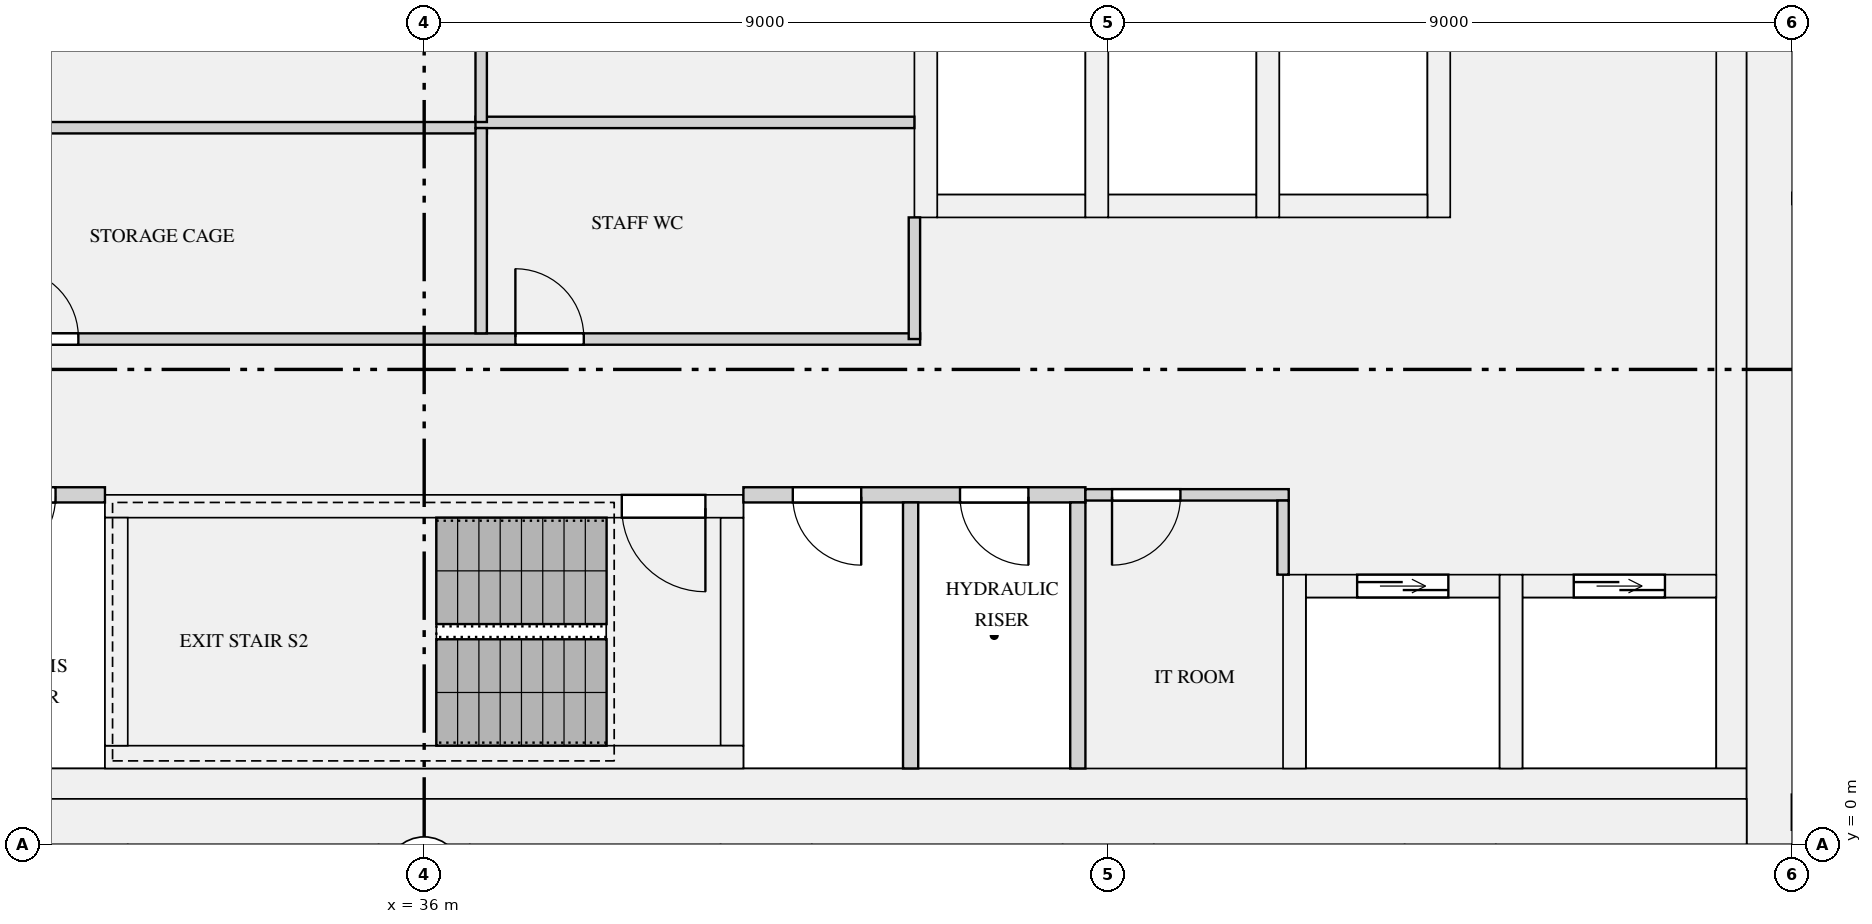
"""IFC4 building model, lengths in metres.
Left out: names, types, materials, properties, quantities, classifications, styles, units other than length and angle.
Written with IfcOpenShell. Run it as: python <this file> out.ifc"""

import sys

from ifc_helpers import new_model, si_unit, direction, frame, frame_2d, origin, place, context, subcontext, project, spatial, rectangle, extrude, element, fill, save


model = new_model("IFC4")
c1 = context("Model", 3, precision=1e-05, world=origin(), true_north=direction((0.0, 1.0)))
c2 = subcontext(c1, "Body", "Model", "MODEL_VIEW")
j1 = project(units=[si_unit("LENGTHUNIT", "METRE"), si_unit("PLANEANGLEUNIT", "RADIAN")], contexts=[c1])
p1 = place(None, origin())
s1 = spatial("IfcSite", under=j1, at=p1, CompositionType="ELEMENT")
p2 = place(p1, origin())
s2 = spatial("IfcBuilding", under=s1, at=p2, CompositionType="ELEMENT")
p3 = place(p2, frame((0.0, 0.0, 229.5)))
s3 = spatial("IfcBuildingStorey", under=s2, at=p3, CompositionType="ELEMENT", Elevation=229.5)
p4 = place(p3, frame((53.7, 0.0, 0.0), z_axis=(0.0, 0.0, 1.0), x_axis=(0.0, 1.0, 0.0)))
e1 = element("IfcWall", 1, at=p4, inside=s3, PredefinedType="SHEAR", context=c2, shape_type="SweptSolid", body=[
    extrude(rectangle(XDim=12.5, YDim=0.6, at=frame_2d((6.25, 0.0))), origin(), (0.0, 0.0, 1.0), 3.15),
])
p5 = place(p3, frame((18.6, 0.3, 0.0), z_axis=(0.0, 0.0, 1.0), x_axis=(1.0, 0.0, 0.0)))
e2 = element("IfcWall", 2, at=p5, inside=s3, PredefinedType="SHEAR", context=c2, shape_type="SweptSolid", body=[
    extrude(rectangle(XDim=34.8, YDim=0.6, at=frame_2d((17.4, 0.0))), origin(), (0.0, 0.0, 1.0), 3.15),
])
p6 = place(p3, frame((53.2, 1.0, 0.0), z_axis=(0.0, 0.0, 1.0), x_axis=(0.0, 1.0, 0.0)))
e3 = element("IfcWall", 3, at=p6, inside=s3, PredefinedType="SHEAR", context=c2, shape_type="SweptSolid", body=[
    extrude(rectangle(XDim=10.9, YDim=0.4, at=frame_2d((5.45, 0.0))), origin(), (0.0, 0.0, 1.0), 3.15),
])
p7 = place(p3, frame((18.6, 0.8, 0.0), z_axis=(0.0, 0.0, 1.0), x_axis=(1.0, 0.0, 0.0)))
e4 = element("IfcWall", 4, at=p7, inside=s3, PredefinedType="SHEAR", context=c2, shape_type="SweptSolid", body=[
    extrude(rectangle(XDim=34.8, YDim=0.4, at=frame_2d((17.4, 0.0))), origin(), (0.0, 0.0, 1.0), 3.15),
])
p8 = place(p3, frame((42.75, 8.4, 0.0), z_axis=(0.0, 0.0, 1.0), x_axis=(1.0, 0.0, 0.0)))
e5 = element("IfcWall", 5, at=p8, inside=s3, PredefinedType="SHEAR", context=c2, shape_type="SweptSolid", body=[
    extrude(rectangle(XDim=1.95, YDim=0.3, at=frame_2d((0.975, 0.0))), origin(), (0.0, 0.0, 1.0), 3.15),
])
p9 = place(p3, frame((42.6, 8.25, 0.0), z_axis=(0.0, 0.0, 1.0), x_axis=(0.0, 1.0, 0.0)))
e6 = element("IfcWall", 6, at=p9, inside=s3, PredefinedType="SHEAR", context=c2, shape_type="SweptSolid", body=[
    extrude(rectangle(XDim=3.65, YDim=0.3, at=frame_2d((1.825, 0.0))), origin(), (0.0, 0.0, 1.0), 3.15),
])
p10 = place(p3, frame((45.0, 8.4, 0.0), z_axis=(0.0, 0.0, 1.0), x_axis=(1.0, 0.0, 0.0)))
e7 = element("IfcWall", 7, at=p10, inside=s3, PredefinedType="SHEAR", context=c2, shape_type="SweptSolid", body=[
    extrude(rectangle(XDim=1.95, YDim=0.3, at=frame_2d((0.975, 0.0))), origin(), (0.0, 0.0, 1.0), 3.15),
])
p11 = place(p3, frame((44.85, 8.25, 0.0), z_axis=(0.0, 0.0, 1.0), x_axis=(0.0, 1.0, 0.0)))
e8 = element("IfcWall", 8, at=p11, inside=s3, PredefinedType="SHEAR", context=c2, shape_type="SweptSolid", body=[
    extrude(rectangle(XDim=3.65, YDim=0.3, at=frame_2d((1.825, 0.0))), origin(), (0.0, 0.0, 1.0), 3.15),
])
p12 = place(p3, frame((47.25, 8.4, 0.0), z_axis=(0.0, 0.0, 1.0), x_axis=(1.0, 0.0, 0.0)))
e9 = element("IfcWall", 9, at=p12, inside=s3, PredefinedType="SHEAR", context=c2, shape_type="SweptSolid", body=[
    extrude(rectangle(XDim=1.95, YDim=0.3, at=frame_2d((0.975, 0.0))), origin(), (0.0, 0.0, 1.0), 3.15),
])
for number, where, z_axis, x_axis in (
    (10, (47.1, 8.25, 0.0), (0.0, 0.0, 1.0), (0.0, 1.0, 0.0)),
    (11, (49.35, 8.25, 0.0), (0.0, 0.0, 1.0), (0.0, 1.0, 0.0)),
):
    element("IfcWall", number, at=place(p3, frame(where, z_axis=z_axis, x_axis=x_axis)), inside=s3, PredefinedType="SHEAR", context=c2, shape_type="SweptSolid", body=[
        extrude(rectangle(XDim=3.65, YDim=0.3, at=frame_2d((1.825, 0.0))), origin(), (0.0, 0.0, 1.0), 3.15),
    ])
p13 = place(p3, frame((47.6, 3.4, 0.0), z_axis=(0.0, 0.0, 1.0), x_axis=(1.0, 0.0, 0.0)))
e12 = element("IfcWall", 12, at=p13, inside=s3, PredefinedType="SHEAR", context=c2, shape_type="SweptSolid", body=[
    extrude(rectangle(XDim=2.55, YDim=0.3, at=frame_2d((1.275, 0.0))), origin(), (0.0, 0.0, 1.0), 3.15),
])
p14 = place(p13, frame((0.675, 0.0, 0.0)))
e13 = element("IfcOpeningElement", 13, at=p14, cuts=e12, PredefinedType="OPENING", context=c2, shape_type="SweptSolid", body=[
    extrude(rectangle(XDim=1.2, YDim=2.1, at=frame_2d((0.6, 1.05))), frame((0.0, 0.16, 0.0), z_axis=(0.0, -1.0, 0.0), x_axis=(1.0, 0.0, 0.0)), (0.0, 0.0, 1.0), 0.32),
])
p15 = place(p3, frame((47.45, 1.0, 0.0), z_axis=(0.0, 0.0, 1.0), x_axis=(0.0, 1.0, 0.0)))
e14 = element("IfcWall", 14, at=p15, inside=s3, PredefinedType="SHEAR", context=c2, shape_type="SweptSolid", body=[
    extrude(rectangle(XDim=2.55, YDim=0.3, at=frame_2d((1.275, 0.0))), origin(), (0.0, 0.0, 1.0), 3.15),
])
p16 = place(p3, frame((50.45, 3.4, 0.0), z_axis=(0.0, 0.0, 1.0), x_axis=(1.0, 0.0, 0.0)))
e15 = element("IfcWall", 15, at=p16, inside=s3, PredefinedType="SHEAR", context=c2, shape_type="SweptSolid", body=[
    extrude(rectangle(XDim=2.55, YDim=0.3, at=frame_2d((1.275, 0.0))), origin(), (0.0, 0.0, 1.0), 3.15),
])
p17 = place(p16, frame((0.675, 0.0, 0.0)))
e16 = element("IfcOpeningElement", 16, at=p17, cuts=e15, PredefinedType="OPENING", context=c2, shape_type="SweptSolid", body=[
    extrude(rectangle(XDim=1.2, YDim=2.1, at=frame_2d((0.6, 1.05))), frame((0.0, 0.16, 0.0), z_axis=(0.0, -1.0, 0.0), x_axis=(1.0, 0.0, 0.0)), (0.0, 0.0, 1.0), 0.32),
])
p18 = place(p3, frame((50.3, 1.0, 0.0), z_axis=(0.0, 0.0, 1.0), x_axis=(0.0, 1.0, 0.0)))
e17 = element("IfcWall", 17, at=p18, inside=s3, PredefinedType="SHEAR", context=c2, shape_type="SweptSolid", body=[
    extrude(rectangle(XDim=2.55, YDim=0.3, at=frame_2d((1.275, 0.0))), origin(), (0.0, 0.0, 1.0), 3.15),
])
p19 = place(p3, frame((31.8, 1.15, 0.0), z_axis=(0.0, 0.0, 1.0), x_axis=(1.0, 0.0, 0.0)))
e18 = element("IfcWall", 18, at=p19, inside=s3, PredefinedType="SHEAR", context=c2, shape_type="SweptSolid", body=[
    extrude(rectangle(XDim=8.4, YDim=0.3, at=frame_2d((4.2, 0.0))), origin(), (0.0, 0.0, 1.0), 3.15),
])
p20 = place(p3, frame((31.8, 4.45, 0.0), z_axis=(0.0, 0.0, 1.0), x_axis=(1.0, 0.0, 0.0)))
e19 = element("IfcWall", 19, at=p20, inside=s3, PredefinedType="SHEAR", context=c2, shape_type="SweptSolid", body=[
    extrude(rectangle(XDim=8.4, YDim=0.3, at=frame_2d((4.2, 0.0))), origin(), (0.0, 0.0, 1.0), 3.15),
])
p21 = place(p20, frame((6.8, 0.0, 0.0)))
e20 = element("IfcOpeningElement", 20, at=p21, cuts=e19, PredefinedType="OPENING", context=c2, shape_type="SweptSolid", body=[
    extrude(rectangle(XDim=1.1, YDim=2.1, at=frame_2d((0.55, 1.05))), frame((0.0, 0.16, 0.0), z_axis=(0.0, -1.0, 0.0), x_axis=(1.0, 0.0, 0.0)), (0.0, 0.0, 1.0), 0.32),
])
for number, where, z_axis, x_axis in (
    (21, (31.95, 1.3, 0.0), (0.0, 0.0, 1.0), (0.0, 1.0, 0.0)),
    (22, (40.05, 1.3, 0.0), (0.0, 0.0, 1.0), (0.0, 1.0, 0.0)),
):
    element("IfcWall", number, at=place(p3, frame(where, z_axis=z_axis, x_axis=x_axis)), inside=s3, PredefinedType="SHEAR", context=c2, shape_type="SweptSolid", body=[
        extrude(rectangle(XDim=3.0, YDim=0.3, at=frame_2d((1.5, 0.0))), origin(), (0.0, 0.0, 1.0), 3.15),
    ])
p22 = place(p3, frame((54.0, 0.425, 0.9), z_axis=(0.0, 0.0, 1.0), x_axis=(1.0, 0.0, 0.0)))
e23 = element("IfcWall", 23, at=p22, inside=s3, PredefinedType="SOLIDWALL", context=c2, shape_type="SweptSolid", body=[
    extrude(rectangle(XDim=4.05, YDim=0.45, at=frame_2d((2.025, 0.0))), origin(), (0.0, 0.0, 1.0), 1.93),
])
p23 = place(p22, frame((1.275, 0.0, 0.15)))
e24 = element("IfcOpeningElement", 24, at=p23, cuts=e23, PredefinedType="OPENING", context=c2, shape_type="SweptSolid", body=[
    extrude(rectangle(XDim=1.5, YDim=1.5, at=frame_2d((0.75, 0.75))), frame((0.0, 0.235, 0.0), z_axis=(0.0, -1.0, 0.0), x_axis=(1.0, 0.0, 0.0)), (0.0, 0.0, 1.0), 0.47),
])
p24 = place(p3, frame((27.3, 4.6, 0.0), z_axis=(0.0, 0.0, 1.0), x_axis=(1.0, 0.0, 0.0)))
e25 = element("IfcWall", 25, at=p24, inside=s3, PredefinedType="PARTITIONING", context=c2, shape_type="SweptSolid", body=[
    extrude(rectangle(XDim=4.5, YDim=0.2, at=frame_2d((2.25, 0.0))), origin(), (0.0, 0.0, 1.0), 2.83),
])
p25 = place(p24, frame((0.75, 0.0, 0.0)))
e26 = element("IfcOpeningElement", 26, at=p25, cuts=e25, PredefinedType="OPENING", context=c2, shape_type="SweptSolid", body=[
    extrude(rectangle(XDim=0.9, YDim=2.1, at=frame_2d((0.45, 1.05))), frame((0.0, 0.11, 0.0), z_axis=(0.0, -1.0, 0.0), x_axis=(1.0, 0.0, 0.0)), (0.0, 0.0, 1.0), 0.22),
])
p26 = place(p24, frame((2.95, 0.0, 0.0)))
e27 = element("IfcOpeningElement", 27, at=p26, cuts=e25, PredefinedType="OPENING", context=c2, shape_type="SweptSolid", body=[
    extrude(rectangle(XDim=0.9, YDim=2.1, at=frame_2d((0.45, 1.05))), frame((0.0, 0.11, 0.0), z_axis=(0.0, -1.0, 0.0), x_axis=(1.0, 0.0, 0.0)), (0.0, 0.0, 1.0), 0.22),
])
p27 = place(p3, frame((40.2, 4.6, 0.0), z_axis=(0.0, 0.0, 1.0), x_axis=(1.0, 0.0, 0.0)))
e28 = element("IfcWall", 28, at=p27, inside=s3, PredefinedType="PARTITIONING", context=c2, shape_type="SweptSolid", body=[
    extrude(rectangle(XDim=4.5, YDim=0.2, at=frame_2d((2.25, 0.0))), origin(), (0.0, 0.0, 1.0), 2.83),
])
p28 = place(p27, frame((0.65, 0.0, 0.0)))
e29 = element("IfcOpeningElement", 29, at=p28, cuts=e28, PredefinedType="OPENING", context=c2, shape_type="SweptSolid", body=[
    extrude(rectangle(XDim=0.9, YDim=2.1, at=frame_2d((0.45, 1.05))), frame((0.0, 0.11, 0.0), z_axis=(0.0, -1.0, 0.0), x_axis=(1.0, 0.0, 0.0)), (0.0, 0.0, 1.0), 0.22),
])
p29 = place(p27, frame((2.85, 0.0, 0.0)))
e30 = element("IfcOpeningElement", 30, at=p29, cuts=e28, PredefinedType="OPENING", context=c2, shape_type="SweptSolid", body=[
    extrude(rectangle(XDim=0.9, YDim=2.1, at=frame_2d((0.45, 1.05))), frame((0.0, 0.11, 0.0), z_axis=(0.0, -1.0, 0.0), x_axis=(1.0, 0.0, 0.0)), (0.0, 0.0, 1.0), 0.22),
])
p30 = place(p3, frame((44.7, 4.6, 0.0), z_axis=(0.0, 0.0, 1.0), x_axis=(1.0, 0.0, 0.0)))
e31 = element("IfcWall", 31, at=p30, inside=s3, PredefinedType="PARTITIONING", context=c2, shape_type="SweptSolid", body=[
    extrude(rectangle(XDim=2.675, YDim=0.15, at=frame_2d((1.337, 0.0))), origin(), (0.0, 0.0, 1.0), 2.83),
])
p31 = place(p30, frame((0.35, 0.0, 0.0)))
e32 = element("IfcOpeningElement", 32, at=p31, cuts=e31, PredefinedType="OPENING", context=c2, shape_type="SweptSolid", body=[
    extrude(rectangle(XDim=0.9, YDim=2.1, at=frame_2d((0.45, 1.05))), frame((0.0, 0.085, 0.0), z_axis=(0.0, -1.0, 0.0), x_axis=(1.0, 0.0, 0.0)), (0.0, 0.0, 1.0), 0.17),
])
p32 = place(p3, frame((22.725, 6.65, 0.0), z_axis=(0.0, 0.0, 1.0), x_axis=(1.0, 0.0, 0.0)))
e33 = element("IfcWall", 33, at=p32, inside=s3, PredefinedType="PARTITIONING", context=c2, shape_type="SweptSolid", body=[
    extrude(rectangle(XDim=19.8, YDim=0.15, at=frame_2d((9.9, 0.0))), origin(), (0.0, 0.0, 1.0), 2.83),
])
p33 = place(p32, frame((0.825, 0.0, 0.0)))
e34 = element("IfcOpeningElement", 34, at=p33, cuts=e33, PredefinedType="OPENING", context=c2, shape_type="SweptSolid", body=[
    extrude(rectangle(XDim=0.9, YDim=2.1, at=frame_2d((0.45, 1.05))), frame((0.0, 0.085, 0.0), z_axis=(0.0, -1.0, 0.0), x_axis=(1.0, 0.0, 0.0)), (0.0, 0.0, 1.0), 0.17),
])
p34 = place(p32, frame((7.825, 0.0, 0.0)))
e35 = element("IfcOpeningElement", 35, at=p34, cuts=e33, PredefinedType="OPENING", context=c2, shape_type="SweptSolid", body=[
    extrude(rectangle(XDim=0.9, YDim=2.1, at=frame_2d((0.45, 1.05))), frame((0.0, 0.085, 0.0), z_axis=(0.0, -1.0, 0.0), x_axis=(1.0, 0.0, 0.0)), (0.0, 0.0, 1.0), 0.17),
])
p35 = place(p32, frame((14.475, 0.0, 0.0)))
e36 = element("IfcOpeningElement", 36, at=p35, cuts=e33, PredefinedType="OPENING", context=c2, shape_type="SweptSolid", body=[
    extrude(rectangle(XDim=0.9, YDim=2.1, at=frame_2d((0.45, 1.05))), frame((0.0, 0.085, 0.0), z_axis=(0.0, -1.0, 0.0), x_axis=(1.0, 0.0, 0.0)), (0.0, 0.0, 1.0), 0.17),
])
p36 = place(p3, frame((22.725, 9.43, 0.0), z_axis=(0.0, 0.0, 1.0), x_axis=(1.0, 0.0, 0.0)))
e37 = element("IfcWall", 37, at=p36, inside=s3, PredefinedType="PARTITIONING", context=c2, shape_type="SweptSolid", body=[
    extrude(rectangle(XDim=14.1, YDim=0.15, at=frame_2d((7.05, 0.0))), origin(), (0.0, 0.0, 1.0), 2.83),
])
p37 = place(p3, frame((36.675, 9.5, 0.0), z_axis=(0.0, 0.0, 1.0), x_axis=(1.0, 0.0, 0.0)))
e38 = element("IfcWall", 38, at=p37, inside=s3, PredefinedType="PARTITIONING", context=c2, shape_type="SweptSolid", body=[
    extrude(rectangle(XDim=5.775, YDim=0.15, at=frame_2d((2.887, 0.0))), origin(), (0.0, 0.0, 1.0), 2.83),
])
for number, where, z_axis, x_axis in (
    (39, (42.4, 1.0, 0.0), (0.0, 0.0, 1.0), (0.0, 1.0, 0.0)),
    (40, (44.6, 1.0, 0.0), (0.0, 0.0, 1.0), (0.0, 1.0, 0.0)),
):
    element("IfcWall", number, at=place(p3, frame(where, z_axis=z_axis, x_axis=x_axis)), inside=s3, PredefinedType="PARTITIONING", context=c2, shape_type="SweptSolid", body=[
        extrude(rectangle(XDim=3.5, YDim=0.2, at=frame_2d((1.75, 0.0))), origin(), (0.0, 0.0, 1.0), 2.83),
    ])
p38 = place(p3, frame((47.3, 3.55, 0.0), z_axis=(0.0, 0.0, 1.0), x_axis=(0.0, 1.0, 0.0)))
e41 = element("IfcWall", 41, at=p38, inside=s3, PredefinedType="PARTITIONING", context=c2, shape_type="SweptSolid", body=[
    extrude(rectangle(XDim=0.975, YDim=0.15, at=frame_2d((0.487, 0.0))), origin(), (0.0, 0.0, 1.0), 2.83),
])
p39 = place(p3, frame((42.45, 6.65, 0.0), z_axis=(0.0, 0.0, 1.0), x_axis=(0.0, 1.0, 0.0)))
e42 = element("IfcWall", 42, at=p39, inside=s3, PredefinedType="PARTITIONING", context=c2, shape_type="SweptSolid", body=[
    extrude(rectangle(XDim=1.6, YDim=0.15, at=frame_2d((0.8, 0.0))), origin(), (0.0, 0.0, 1.0), 2.83),
])
p40 = place(p3, frame((36.75, 6.725, 0.0), z_axis=(0.0, 0.0, 1.0), x_axis=(0.0, 1.0, 0.0)))
e43 = element("IfcWall", 43, at=p40, inside=s3, PredefinedType="PARTITIONING", context=c2, shape_type="SweptSolid", body=[
    extrude(rectangle(XDim=2.7, YDim=0.15, at=frame_2d((1.35, 0.0))), origin(), (0.0, 0.0, 1.0), 2.83),
])
p41 = place(p3, frame((36.75, 9.505, 0.0), z_axis=(0.0, 0.0, 1.0), x_axis=(0.0, 1.0, 0.0)))
e44 = element("IfcWall", 44, at=p41, inside=s3, PredefinedType="PARTITIONING", context=c2, shape_type="SweptSolid", body=[
    extrude(rectangle(XDim=2.395, YDim=0.15, at=frame_2d((1.198, 0.0))), origin(), (0.0, 0.0, 1.0), 2.83),
])
p42 = place(p14, origin())
e45 = element("IfcDoor", 45, at=p42, inside=s3, OperationType="DOUBLE_DOOR_SLIDING", PredefinedType="DOOR", context=c2, shape_type="SweptSolid", body=[
    extrude(rectangle(XDim=1.2, YDim=2.1, at=frame_2d((0.6, 1.05))), frame((0.0, 0.025, 0.0), z_axis=(0.0, -1.0, 0.0), x_axis=(1.0, 0.0, 0.0)), (0.0, 0.0, 1.0), 0.05),
])
fill(e13, e45)
p43 = place(p17, origin())
e46 = element("IfcDoor", 46, at=p43, inside=s3, OperationType="DOUBLE_DOOR_SLIDING", PredefinedType="DOOR", context=c2, shape_type="SweptSolid", body=[
    extrude(rectangle(XDim=1.2, YDim=2.1, at=frame_2d((0.6, 1.05))), frame((0.0, 0.025, 0.0), z_axis=(0.0, -1.0, 0.0), x_axis=(1.0, 0.0, 0.0)), (0.0, 0.0, 1.0), 0.05),
])
fill(e16, e46)
p44 = place(p21, frame((1.1, 0.0, 0.0), z_axis=(0.0, 0.0, 1.0), x_axis=(-1.0, 0.0, 0.0)))
e47 = element("IfcDoor", 47, at=p44, inside=s3, OperationType="SINGLE_SWING_LEFT", PredefinedType="DOOR", context=c2, shape_type="SweptSolid", body=[
    extrude(rectangle(XDim=1.1, YDim=2.1, at=frame_2d((0.55, 1.05))), frame((0.0, 0.025, 0.0), z_axis=(0.0, -1.0, 0.0), x_axis=(1.0, 0.0, 0.0)), (0.0, 0.0, 1.0), 0.05),
])
fill(e20, e47)
p45 = place(p31, frame((0.9, 0.0, 0.0), z_axis=(0.0, 0.0, 1.0), x_axis=(-1.0, 0.0, 0.0)))
e48 = element("IfcDoor", 48, at=p45, inside=s3, OperationType="SINGLE_SWING_RIGHT", PredefinedType="DOOR", context=c2, shape_type="SweptSolid", body=[
    extrude(rectangle(XDim=0.9, YDim=2.1, at=frame_2d((0.45, 1.05))), frame((0.0, 0.025, 0.0), z_axis=(0.0, -1.0, 0.0), x_axis=(1.0, 0.0, 0.0)), (0.0, 0.0, 1.0), 0.05),
])
fill(e32, e48)
p46 = place(p34, origin())
e49 = element("IfcDoor", 49, at=p46, inside=s3, OperationType="SINGLE_SWING_LEFT", PredefinedType="DOOR", context=c2, shape_type="SweptSolid", body=[
    extrude(rectangle(XDim=0.9, YDim=2.1, at=frame_2d((0.45, 1.05))), frame((0.0, 0.025, 0.0), z_axis=(0.0, -1.0, 0.0), x_axis=(1.0, 0.0, 0.0)), (0.0, 0.0, 1.0), 0.05),
])
fill(e35, e49)
p47 = place(p35, origin())
e50 = element("IfcDoor", 50, at=p47, inside=s3, OperationType="SINGLE_SWING_LEFT", PredefinedType="DOOR", context=c2, shape_type="SweptSolid", body=[
    extrude(rectangle(XDim=0.9, YDim=2.1, at=frame_2d((0.45, 1.05))), frame((0.0, 0.025, 0.0), z_axis=(0.0, -1.0, 0.0), x_axis=(1.0, 0.0, 0.0)), (0.0, 0.0, 1.0), 0.05),
])
fill(e36, e50)
p48 = place(p26, frame((0.9, 0.0, 0.0), z_axis=(0.0, 0.0, 1.0), x_axis=(-1.0, 0.0, 0.0)))
e51 = element("IfcDoor", 51, at=p48, inside=s3, OperationType="SINGLE_SWING_RIGHT", PredefinedType="DOOR", context=c2, shape_type="SweptSolid", body=[
    extrude(rectangle(XDim=0.9, YDim=2.1, at=frame_2d((0.45, 1.05))), frame((0.0, 0.025, 0.0), z_axis=(0.0, -1.0, 0.0), x_axis=(1.0, 0.0, 0.0)), (0.0, 0.0, 1.0), 0.05),
])
fill(e27, e51)
p49 = place(p28, frame((0.9, 0.0, 0.0), z_axis=(0.0, 0.0, 1.0), x_axis=(-1.0, 0.0, 0.0)))
e52 = element("IfcDoor", 52, at=p49, inside=s3, OperationType="SINGLE_SWING_LEFT", PredefinedType="DOOR", context=c2, shape_type="SweptSolid", body=[
    extrude(rectangle(XDim=0.9, YDim=2.1, at=frame_2d((0.45, 1.05))), frame((0.0, 0.025, 0.0), z_axis=(0.0, -1.0, 0.0), x_axis=(1.0, 0.0, 0.0)), (0.0, 0.0, 1.0), 0.05),
])
fill(e29, e52)
p50 = place(p29, frame((0.9, 0.0, 0.0), z_axis=(0.0, 0.0, 1.0), x_axis=(-1.0, 0.0, 0.0)))
e53 = element("IfcDoor", 53, at=p50, inside=s3, OperationType="SINGLE_SWING_LEFT", PredefinedType="DOOR", context=c2, shape_type="SweptSolid", body=[
    extrude(rectangle(XDim=0.9, YDim=2.1, at=frame_2d((0.45, 1.05))), frame((0.0, 0.025, 0.0), z_axis=(0.0, -1.0, 0.0), x_axis=(1.0, 0.0, 0.0)), (0.0, 0.0, 1.0), 0.05),
])
fill(e30, e53)
save(model, sys.argv[1])
